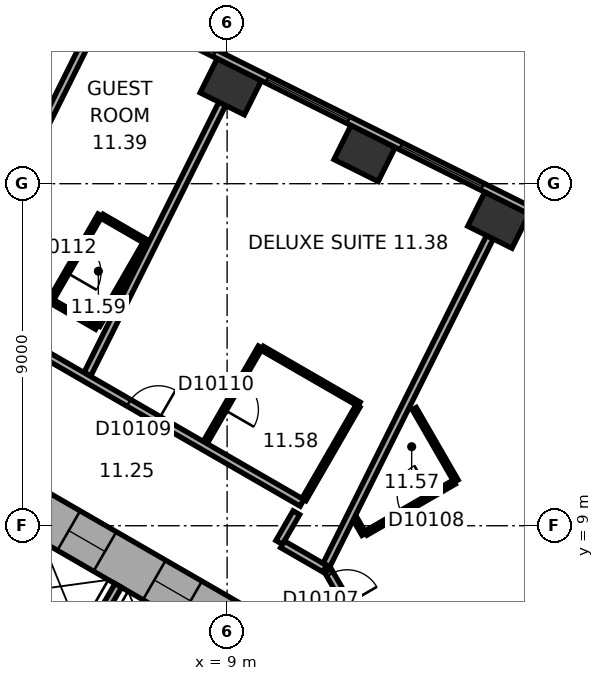
"""IFC4 building model, lengths in metres.
Left out: names, types, materials, properties, quantities, classifications, styles, units other than length and angle.
Written with IfcOpenShell. Run it as: python <this file> out.ifc"""

import sys

from ifc_helpers import new_model, si_unit, direction, frame, frame_2d, origin, origin_2d, place, context, subcontext, project, spatial, rectangle, extrude, element, fill, save


model = new_model("IFC4")
c1 = context("Model", 3, precision=1e-05, world=origin(), true_north=direction((0.0, 1.0)))
c2 = subcontext(c1, "Body", "Model", "MODEL_VIEW")
j1 = project(units=[si_unit("LENGTHUNIT", "METRE"), si_unit("PLANEANGLEUNIT", "RADIAN")], contexts=[c1])
p1 = place(None, origin())
s1 = spatial("IfcSite", under=j1, at=p1, CompositionType="ELEMENT")
p2 = place(p1, origin())
s2 = spatial("IfcBuilding", under=s1, at=p2, CompositionType="ELEMENT")
p3 = place(p2, frame((0.0, 0.0, 57.2)))
s3 = spatial("IfcBuildingStorey", under=s2, at=p3, CompositionType="ELEMENT", Elevation=57.2)
for number, where, z_axis, x_axis in (
    (1, (16.138, 17.04, 0.0), (0.0, 0.0, 1.0), (-0.895, 0.446, 0.0)),
    (2, (12.616, 18.795, 0.0), (0.0, 0.0, 1.0), (-0.895, 0.446, 0.0)),
    (3, (9.095, 20.551, 0.0), (0.0, 0.0, 1.0), (-0.895, 0.446, 0.0)),
):
    element("IfcColumn", number, at=place(p3, frame(where, z_axis=z_axis, x_axis=x_axis)), inside=s3, PredefinedType="COLUMN", context=c2, shape_type="SweptSolid", body=[
        extrude(rectangle(XDim=1.3, YDim=1.0, at=origin_2d()), origin(), (0.0, 0.0, 1.0), 3.3),
    ])
p4 = place(p3, frame((10.4, 5.658, 0.0), z_axis=(0.0, 0.0, 1.0), x_axis=(-0.866021384402, 0.500006961711, 0.0)))
e4 = element("IfcWall", 4, at=p4, inside=s3, PredefinedType="SHEAR", context=c2, shape_type="SweptSolid", body=[
    extrude(rectangle(XDim=12.355, YDim=1.2, at=frame_2d((6.178, 0.0))), origin(), (0.0, 0.0, 1.0), 3.3),
])
p5 = place(p4, frame((2.728, 0.0, 0.0)))
e5 = element("IfcOpeningElement", 5, at=p5, cuts=e4, PredefinedType="OPENING", context=c2, shape_type="SweptSolid", body=[
    extrude(rectangle(XDim=1.1, YDim=2.1, at=frame_2d((0.55, 1.05))), frame((0.0, 0.61, 0.0), z_axis=(0.0, -1.0, 0.0), x_axis=(1.0, 0.0, 0.0)), (0.0, 0.0, 1.0), 1.22),
])
p6 = place(p4, frame((5.328, 0.0, 0.0)))
e6 = element("IfcOpeningElement", 6, at=p6, cuts=e4, PredefinedType="OPENING", context=c2, shape_type="SweptSolid", body=[
    extrude(rectangle(XDim=1.1, YDim=2.1, at=frame_2d((0.55, 1.05))), frame((0.0, 0.61, 0.0), z_axis=(0.0, -1.0, 0.0), x_axis=(1.0, 0.0, 0.0)), (0.0, 0.0, 1.0), 1.22),
])
p7 = place(p4, frame((7.928, 0.0, 0.0)))
e7 = element("IfcOpeningElement", 7, at=p7, cuts=e4, PredefinedType="OPENING", context=c2, shape_type="SweptSolid", body=[
    extrude(rectangle(XDim=1.1, YDim=2.1, at=frame_2d((0.55, 1.05))), frame((0.0, 0.61, 0.0), z_axis=(0.0, -1.0, 0.0), x_axis=(1.0, 0.0, 0.0)), (0.0, 0.0, 1.0), 1.22),
])
p8 = place(p3, frame((20.63, 15.47, 0.0), z_axis=(0.0, 0.0, 1.0), x_axis=(-0.894934518609, 0.446197498203, 0.0)))
e8 = element("IfcWall", 8, at=p8, inside=s3, PredefinedType="STANDARD", context=c2, shape_type="SweptSolid", body=[
    extrude(rectangle(XDim=21.246, YDim=0.2, at=frame_2d((10.623, 0.0))), origin(), (0.0, 0.0, 1.0), 3.3),
])
p9 = place(p8, frame((1.553, 0.0, 0.8)))
e9 = element("IfcOpeningElement", 9, at=p9, cuts=e8, PredefinedType="OPENING", context=c2, shape_type="SweptSolid", body=[
    extrude(rectangle(XDim=2.4, YDim=1.7, at=frame_2d((1.2, 0.85))), frame((0.0, 0.11, 0.0), z_axis=(0.0, -1.0, 0.0), x_axis=(1.0, 0.0, 0.0)), (0.0, 0.0, 1.0), 0.22),
])
p10 = place(p8, frame((5.488, 0.0, 0.8)))
e10 = element("IfcOpeningElement", 10, at=p10, cuts=e8, PredefinedType="OPENING", context=c2, shape_type="SweptSolid", body=[
    extrude(rectangle(XDim=2.4, YDim=1.7, at=frame_2d((1.2, 0.85))), frame((0.0, 0.11, 0.0), z_axis=(0.0, -1.0, 0.0), x_axis=(1.0, 0.0, 0.0)), (0.0, 0.0, 1.0), 0.22),
])
p11 = place(p8, frame((9.422, 0.0, 0.8)))
e11 = element("IfcOpeningElement", 11, at=p11, cuts=e8, PredefinedType="OPENING", context=c2, shape_type="SweptSolid", body=[
    extrude(rectangle(XDim=2.4, YDim=1.7, at=frame_2d((1.2, 0.85))), frame((0.0, 0.11, 0.0), z_axis=(0.0, -1.0, 0.0), x_axis=(1.0, 0.0, 0.0)), (0.0, 0.0, 1.0), 0.22),
])
p12 = place(p8, frame((13.357, 0.0, 0.8)))
e12 = element("IfcOpeningElement", 12, at=p12, cuts=e8, PredefinedType="OPENING", context=c2, shape_type="SweptSolid", body=[
    extrude(rectangle(XDim=2.4, YDim=1.7, at=frame_2d((1.2, 0.85))), frame((0.0, 0.11, 0.0), z_axis=(0.0, -1.0, 0.0), x_axis=(1.0, 0.0, 0.0)), (0.0, 0.0, 1.0), 0.22),
])
p13 = place(p8, frame((17.292, 0.0, 0.8)))
e13 = element("IfcOpeningElement", 13, at=p13, cuts=e8, PredefinedType="OPENING", context=c2, shape_type="SweptSolid", body=[
    extrude(rectangle(XDim=2.4, YDim=1.7, at=frame_2d((1.2, 0.85))), frame((0.0, 0.11, 0.0), z_axis=(0.0, -1.0, 0.0), x_axis=(1.0, 0.0, 0.0)), (0.0, 0.0, 1.0), 0.22),
])
p14 = place(p3, frame((7.424, 4.259, 0.0), z_axis=(0.0, 0.0, 1.0), x_axis=(-0.866026010844, 0.49999894854, 0.0)))
e14 = element("IfcWall", 14, at=p14, inside=s3, PredefinedType="PARTITIONING", context=c2, shape_type="SweptSolid", body=[
    extrude(rectangle(XDim=8.0, YDim=0.2, at=frame_2d((4.0, 0.0))), origin(), (0.0, 0.0, 1.0), 3.05),
])
p15 = place(p3, frame((5.036, 5.522, 0.0), z_axis=(0.0, 0.0, 1.0), x_axis=(0.499946605688, 0.86605622881, 0.0)))
e15 = element("IfcWall", 15, at=p15, inside=s3, PredefinedType="PARTITIONING", context=c2, shape_type="SweptSolid", body=[
    extrude(rectangle(XDim=2.2, YDim=0.2, at=frame_2d((1.1, 0.0))), origin(), (0.0, 0.0, 1.0), 3.05),
])
p16 = place(p3, frame((6.303, 4.617, 0.0), z_axis=(0.0, 0.0, 1.0), x_axis=(-0.866027801685, 0.499995846692, 0.0)))
e16 = element("IfcWall", 16, at=p16, inside=s3, PredefinedType="SHEAR", context=c2, shape_type="SweptSolid", body=[
    extrude(rectangle(XDim=7.06, YDim=0.3, at=frame_2d((3.53, 0.0))), origin(), (0.0, 0.0, 1.0), 3.05),
])
p17 = place(p3, frame((4.356, 14.922, 0.0), z_axis=(0.0, 0.0, 1.0), x_axis=(0.499936506574, 0.866062058628, 0.0)))
e17 = element("IfcWall", 17, at=p17, inside=s3, PredefinedType="PARTITIONING", context=c2, shape_type="SweptSolid", body=[
    extrude(rectangle(XDim=2.6, YDim=0.12, at=frame_2d((1.3, 0.0))), origin(), (0.0, 0.0, 1.0), 3.05),
])
p18 = place(p17, frame((0.85, 0.0, 0.0)))
e18 = element("IfcOpeningElement", 18, at=p18, cuts=e17, PredefinedType="OPENING", context=c2, shape_type="SweptSolid", body=[
    extrude(rectangle(XDim=0.9, YDim=2.1, at=frame_2d((0.45, 1.05))), frame((0.0, 0.07, 0.0), z_axis=(0.0, -1.0, 0.0), x_axis=(1.0, 0.0, 0.0)), (0.0, 0.0, 1.0), 0.14),
])
p19 = place(p3, frame((5.351, 21.859, 0.0), z_axis=(0.0, 0.0, 1.0), x_axis=(-0.446205309328, -0.894930624086, 0.0)))
e19 = element("IfcWall", 19, at=p19, inside=s3, PredefinedType="PARTITIONING", context=c2, shape_type="SweptSolid", body=[
    extrude(rectangle(XDim=8.913, YDim=0.2, at=frame_2d((4.457, 0.0))), origin(), (0.0, 0.0, 1.0), 2.6),
])
p20 = place(p3, frame((5.569, 14.222, 0.0), z_axis=(0.0, 0.0, 1.0), x_axis=(-0.866036909293, 0.499980071345, 0.0)))
e20 = element("IfcWall", 20, at=p20, inside=s3, PredefinedType="PARTITIONING", context=c2, shape_type="SweptSolid", body=[
    extrude(rectangle(XDim=1.34, YDim=0.12, at=frame_2d((0.67, 0.0))), origin(), (0.0, 0.0, 1.0), 3.05),
])
p21 = place(p3, frame((5.708, 17.144, 0.0), z_axis=(0.0, 0.0, 1.0), x_axis=(0.866082447003, -0.499901185229, 0.0)))
e21 = element("IfcWall", 21, at=p21, inside=s3, PredefinedType="PARTITIONING", context=c2, shape_type="SweptSolid", body=[
    extrude(rectangle(XDim=1.34, YDim=0.12, at=frame_2d((0.67, 0.0))), origin(), (0.0, 0.0, 1.0), 3.05),
])
p22 = place(p3, frame((6.839, 16.422, 0.0), z_axis=(0.0, 0.0, 1.0), x_axis=(-0.50000366821, -0.866023285932, 0.0)))
e22 = element("IfcWall", 22, at=p22, inside=s3, PredefinedType="PARTITIONING", context=c2, shape_type="SweptSolid", body=[
    extrude(rectangle(XDim=2.48, YDim=0.12, at=frame_2d((1.24, 0.0))), origin(), (0.0, 0.0, 1.0), 3.05),
])
p23 = place(p3, frame((8.424, 11.188, 0.0), z_axis=(0.0, 0.0, 1.0), x_axis=(0.49995078051, 0.866053818805, 0.0)))
e23 = element("IfcWall", 23, at=p23, inside=s3, PredefinedType="PARTITIONING", context=c2, shape_type="SweptSolid", body=[
    extrude(rectangle(XDim=2.9, YDim=0.12, at=frame_2d((1.45, 0.0))), origin(), (0.0, 0.0, 1.0), 3.05),
])
p24 = place(p23, frame((1.0, 0.0, 0.0)))
e24 = element("IfcOpeningElement", 24, at=p24, cuts=e23, PredefinedType="OPENING", context=c2, shape_type="SweptSolid", body=[
    extrude(rectangle(XDim=0.9, YDim=2.1, at=frame_2d((0.45, 1.05))), frame((0.0, 0.07, 0.0), z_axis=(0.0, -1.0, 0.0), x_axis=(1.0, 0.0, 0.0)), (0.0, 0.0, 1.0), 0.14),
])
p25 = place(p3, frame((8.872, 20.104, 0.0), z_axis=(0.0, 0.0, 1.0), x_axis=(-0.446218378653, -0.894924107706, 0.0)))
e25 = element("IfcWall", 25, at=p25, inside=s3, PredefinedType="PARTITIONING", context=c2, shape_type="SweptSolid", body=[
    extrude(rectangle(XDim=7.95, YDim=0.2, at=frame_2d((3.975, 0.0))), origin(), (0.0, 0.0, 1.0), 3.05),
])
p26 = place(p3, frame((9.926, 13.67, 0.0), z_axis=(0.0, 0.0, 1.0), x_axis=(0.866032090307, -0.499988418424, 0.0)))
e26 = element("IfcWall", 26, at=p26, inside=s3, PredefinedType="PARTITIONING", context=c2, shape_type="SweptSolid", body=[
    extrude(rectangle(XDim=2.94, YDim=0.12, at=frame_2d((1.47, 0.0))), origin(), (0.0, 0.0, 1.0), 3.05),
])
p27 = place(p3, frame((10.371, 8.561, 0.0), z_axis=(0.0, 0.0, 1.0), x_axis=(0.50004290449, 0.866000631449, 0.0)))
e27 = element("IfcWall", 27, at=p27, inside=s3, PredefinedType="PARTITIONING", context=c2, shape_type="SweptSolid", body=[
    extrude(rectangle(XDim=0.901, YDim=0.2, at=frame_2d((0.451, 0.0))), origin(), (0.0, 0.0, 1.0), 3.05),
])
p28 = place(p3, frame((10.972, 9.602, 0.0), z_axis=(0.0, 0.0, 1.0), x_axis=(-0.866033277307, 0.499986362411, 0.0)))
e28 = element("IfcWall", 28, at=p28, inside=s3, PredefinedType="PARTITIONING", context=c2, shape_type="SweptSolid", body=[
    extrude(rectangle(XDim=8.702, YDim=0.2, at=frame_2d((4.351, 0.0))), origin(), (0.0, 0.0, 1.0), 3.05),
])
p29 = place(p28, frame((4.364, 0.0, 0.0)))
e29 = element("IfcOpeningElement", 29, at=p29, cuts=e28, PredefinedType="OPENING", context=c2, shape_type="SweptSolid", body=[
    extrude(rectangle(XDim=0.9, YDim=2.1, at=frame_2d((0.45, 1.05))), frame((0.0, 0.11, 0.0), z_axis=(0.0, -1.0, 0.0), x_axis=(1.0, 0.0, 0.0)), (0.0, 0.0, 1.0), 0.22),
])
p30 = place(p3, frame((11.566, 7.871, 0.0), z_axis=(0.0, 0.0, 1.0), x_axis=(-0.866004557827, 0.500036104519, 0.0)))
e30 = element("IfcWall", 30, at=p30, inside=s3, PredefinedType="PARTITIONING", context=c2, shape_type="SweptSolid", body=[
    extrude(rectangle(XDim=1.28, YDim=0.2, at=frame_2d((0.64, 0.0))), origin(), (0.0, 0.0, 1.0), 3.05),
])
p31 = place(p3, frame((12.442, 12.148, 0.0), z_axis=(0.0, 0.0, 1.0), x_axis=(-0.49994816717, -0.866055327414, 0.0)))
e31 = element("IfcWall", 31, at=p31, inside=s3, PredefinedType="PARTITIONING", context=c2, shape_type="SweptSolid", body=[
    extrude(rectangle(XDim=2.84, YDim=0.12, at=frame_2d((1.42, 0.0))), origin(), (0.0, 0.0, 1.0), 3.05),
])
p32 = place(p3, frame((12.58, 6.212, 0.0), z_axis=(0.0, 0.0, 1.0), x_axis=(-0.500063286585, 0.865988862174, 0.0)))
e32 = element("IfcWall", 32, at=p32, inside=s3, PredefinedType="PARTITIONING", context=c2, shape_type="SweptSolid", body=[
    extrude(rectangle(XDim=1.86, YDim=0.2, at=frame_2d((0.93, 0.0))), origin(), (0.0, 0.0, 1.0), 3.05),
])
p33 = place(p32, frame((0.842, 0.0, 0.0)))
e33 = element("IfcOpeningElement", 33, at=p33, cuts=e32, PredefinedType="OPENING", context=c2, shape_type="SweptSolid", body=[
    extrude(rectangle(XDim=0.9, YDim=2.1, at=frame_2d((0.45, 1.05))), frame((0.0, 0.11, 0.0), z_axis=(0.0, -1.0, 0.0), x_axis=(1.0, 0.0, 0.0)), (0.0, 0.0, 1.0), 0.22),
])
p34 = place(p3, frame((12.601, 8.776, 0.0), z_axis=(0.0, 0.0, 1.0), x_axis=(-0.500166486798, 0.865929261247, 0.0)))
e34 = element("IfcWall", 34, at=p34, inside=s3, PredefinedType="PARTITIONING", context=c2, shape_type="SweptSolid", body=[
    extrude(rectangle(XDim=0.476, YDim=0.12, at=frame_2d((0.238, 0.0))), origin(), (0.0, 0.0, 1.0), 3.05),
])
p35 = place(p3, frame((13.926, 12.081, 0.0), z_axis=(0.0, 0.0, 1.0), x_axis=(0.499994660107, -0.866028486751, 0.0)))
e35 = element("IfcWall", 35, at=p35, inside=s3, PredefinedType="PARTITIONING", context=c2, shape_type="SweptSolid", body=[
    extrude(rectangle(XDim=2.2, YDim=0.12, at=frame_2d((1.1, 0.0))), origin(), (0.0, 0.0, 1.0), 3.05),
])
p36 = place(p3, frame((14.974, 10.146, 0.0), z_axis=(0.0, 0.0, 1.0), x_axis=(-0.86599746015, -0.500048396672, 0.0)))
e36 = element("IfcWall", 36, at=p36, inside=s3, PredefinedType="PARTITIONING", context=c2, shape_type="SweptSolid", body=[
    extrude(rectangle(XDim=2.68, YDim=0.12, at=frame_2d((1.34, 0.0))), origin(), (0.0, 0.0, 1.0), 3.05),
])
p37 = place(p36, frame((0.69, 0.0, 0.0)))
e37 = element("IfcOpeningElement", 37, at=p37, cuts=e36, PredefinedType="OPENING", context=c2, shape_type="SweptSolid", body=[
    extrude(rectangle(XDim=0.9, YDim=2.1, at=frame_2d((0.45, 1.05))), frame((0.0, 0.07, 0.0), z_axis=(0.0, -1.0, 0.0), x_axis=(1.0, 0.0, 0.0)), (0.0, 0.0, 1.0), 0.14),
])
p38 = place(p3, frame((15.915, 16.592, 0.0), z_axis=(0.0, 0.0, 1.0), x_axis=(-0.446199736347, -0.894933402709, 0.0)))
e38 = element("IfcWall", 38, at=p38, inside=s3, PredefinedType="PARTITIONING", context=c2, shape_type="SweptSolid", body=[
    extrude(rectangle(XDim=9.635, YDim=0.2, at=frame_2d((4.817, 0.0))), origin(), (0.0, 0.0, 1.0), 3.05),
])
p39 = place(p10, origin())
e39 = element("IfcWindow", 39, at=p39, inside=s3, PartitioningType="SINGLE_PANEL", PredefinedType="WINDOW", context=c2, shape_type="SweptSolid", body=[
    extrude(rectangle(XDim=2.4, YDim=1.7, at=frame_2d((1.2, 0.85))), frame((0.0, 0.03, 0.0), z_axis=(0.0, -1.0, 0.0), x_axis=(1.0, 0.0, 0.0)), (0.0, 0.0, 1.0), 0.06),
])
fill(e10, e39)
p40 = place(p11, origin())
e40 = element("IfcWindow", 40, at=p40, inside=s3, PartitioningType="SINGLE_PANEL", PredefinedType="WINDOW", context=c2, shape_type="SweptSolid", body=[
    extrude(rectangle(XDim=2.4, YDim=1.7, at=frame_2d((1.2, 0.85))), frame((0.0, 0.03, 0.0), z_axis=(0.0, -1.0, 0.0), x_axis=(1.0, 0.0, 0.0)), (0.0, 0.0, 1.0), 0.06),
])
fill(e11, e40)
p41 = place(p12, origin())
e41 = element("IfcWindow", 41, at=p41, inside=s3, PartitioningType="SINGLE_PANEL", PredefinedType="WINDOW", context=c2, shape_type="SweptSolid", body=[
    extrude(rectangle(XDim=2.4, YDim=1.7, at=frame_2d((1.2, 0.85))), frame((0.0, 0.03, 0.0), z_axis=(0.0, -1.0, 0.0), x_axis=(1.0, 0.0, 0.0)), (0.0, 0.0, 1.0), 0.06),
])
fill(e12, e41)
p42 = place(p5, origin())
e42 = element("IfcDoor", 42, at=p42, inside=s3, OperationType="DOUBLE_DOOR_SLIDING", PredefinedType="DOOR", context=c2, shape_type="SweptSolid", body=[
    extrude(rectangle(XDim=1.1, YDim=2.1, at=frame_2d((0.55, 1.05))), frame((0.0, 0.025, 0.0), z_axis=(0.0, -1.0, 0.0), x_axis=(1.0, 0.0, 0.0)), (0.0, 0.0, 1.0), 0.05),
])
fill(e5, e42)
p43 = place(p6, origin())
e43 = element("IfcDoor", 43, at=p43, inside=s3, OperationType="DOUBLE_DOOR_SLIDING", PredefinedType="DOOR", context=c2, shape_type="SweptSolid", body=[
    extrude(rectangle(XDim=1.1, YDim=2.1, at=frame_2d((0.55, 1.05))), frame((0.0, 0.025, 0.0), z_axis=(0.0, -1.0, 0.0), x_axis=(1.0, 0.0, 0.0)), (0.0, 0.0, 1.0), 0.05),
])
fill(e6, e43)
p44 = place(p33, origin())
e44 = element("IfcDoor", 44, at=p44, inside=s3, OperationType="SINGLE_SWING_LEFT", PredefinedType="DOOR", context=c2, shape_type="SweptSolid", body=[
    extrude(rectangle(XDim=0.9, YDim=2.1, at=frame_2d((0.45, 1.05))), frame((0.0, 0.025, 0.0), z_axis=(0.0, -1.0, 0.0), x_axis=(1.0, 0.0, 0.0)), (0.0, 0.0, 1.0), 0.05),
])
fill(e33, e44)
p45 = place(p37, origin())
e45 = element("IfcDoor", 45, at=p45, inside=s3, OperationType="SINGLE_SWING_LEFT", PredefinedType="DOOR", context=c2, shape_type="SweptSolid", body=[
    extrude(rectangle(XDim=0.9, YDim=2.1, at=frame_2d((0.45, 1.05))), frame((0.0, 0.025, 0.0), z_axis=(0.0, -1.0, 0.0), x_axis=(1.0, 0.0, 0.0)), (0.0, 0.0, 1.0), 0.05),
])
fill(e37, e45)
p46 = place(p29, origin())
e46 = element("IfcDoor", 46, at=p46, inside=s3, OperationType="SINGLE_SWING_LEFT", PredefinedType="DOOR", context=c2, shape_type="SweptSolid", body=[
    extrude(rectangle(XDim=0.9, YDim=2.1, at=frame_2d((0.45, 1.05))), frame((0.0, 0.025, 0.0), z_axis=(0.0, -1.0, 0.0), x_axis=(1.0, 0.0, 0.0)), (0.0, 0.0, 1.0), 0.05),
])
fill(e29, e46)
p47 = place(p24, origin())
e47 = element("IfcDoor", 47, at=p47, inside=s3, OperationType="SINGLE_SWING_LEFT", PredefinedType="DOOR", context=c2, shape_type="SweptSolid", body=[
    extrude(rectangle(XDim=0.9, YDim=2.1, at=frame_2d((0.45, 1.05))), frame((0.0, 0.025, 0.0), z_axis=(0.0, -1.0, 0.0), x_axis=(1.0, 0.0, 0.0)), (0.0, 0.0, 1.0), 0.05),
])
fill(e24, e47)
p48 = place(p18, origin())
e48 = element("IfcDoor", 48, at=p48, inside=s3, OperationType="SINGLE_SWING_LEFT", PredefinedType="DOOR", context=c2, shape_type="SweptSolid", body=[
    extrude(rectangle(XDim=0.9, YDim=2.1, at=frame_2d((0.45, 1.05))), frame((0.0, 0.025, 0.0), z_axis=(0.0, -1.0, 0.0), x_axis=(1.0, 0.0, 0.0)), (0.0, 0.0, 1.0), 0.05),
])
fill(e18, e48)
save(model, sys.argv[1])
